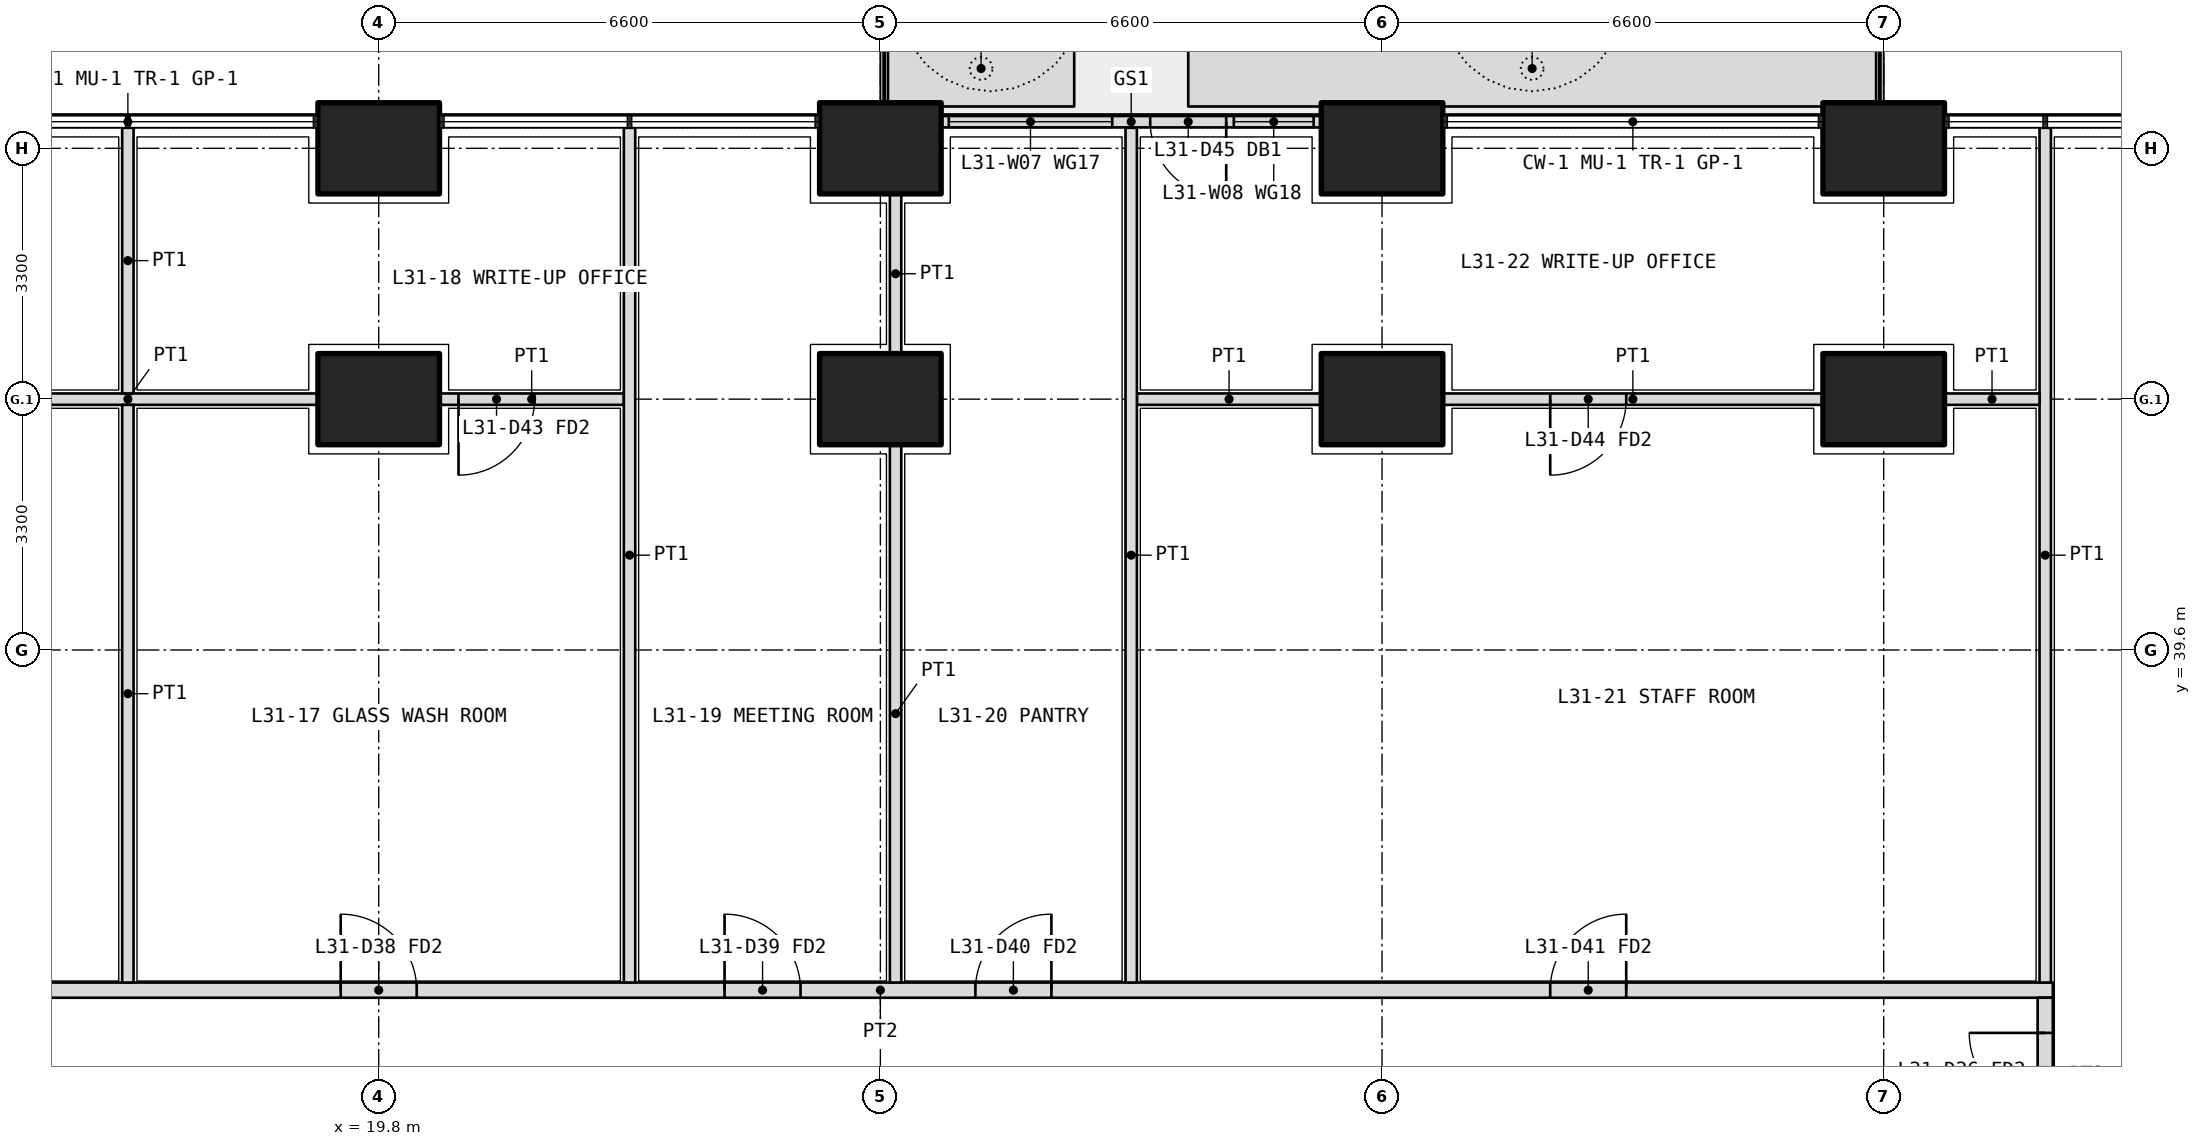
"""IFC4 building model, lengths in metres.
Left out: names, types, materials, properties, quantities, classifications, styles, units other than length and angle.
Written with IfcOpenShell. Run it as: python <this file> out.ifc"""

import sys

from ifc_helpers import new_model, si_unit, direction, frame, frame_2d, origin, origin_2d, place, context, subcontext, project, spatial, polyline, rectangle, outline, extrude, element, fill, save


model = new_model("IFC4")
c1 = context("Model", 3, precision=1e-05, world=origin(), true_north=direction((0.0, 1.0)))
c2 = subcontext(c1, "Body", "Model", "MODEL_VIEW")
j1 = project(units=[si_unit("LENGTHUNIT", "METRE"), si_unit("PLANEANGLEUNIT", "RADIAN")], contexts=[c1])
p1 = place(None, origin())
s1 = spatial("IfcSite", under=j1, at=p1, CompositionType="ELEMENT")
p2 = place(p1, origin())
s2 = spatial("IfcBuilding", under=s1, at=p2, CompositionType="ELEMENT")
p3 = place(p2, frame((0.0, 0.0, 136.8)))
s3 = spatial("IfcBuildingStorey", under=s2, at=p3, CompositionType="ELEMENT", Elevation=136.8)
for number, where, z_axis, x_axis in (
    (1, (19.8, 46.2, 0.0), (0.0, 0.0, 1.0), (1.0, 0.0, 0.0)),
    (2, (26.4, 46.2, 0.0), (0.0, 0.0, 1.0), (1.0, 0.0, 0.0)),
    (3, (33.0, 46.2, 0.0), (0.0, 0.0, 1.0), (1.0, 0.0, 0.0)),
    (4, (39.6, 46.2, 0.0), (0.0, 0.0, 1.0), (1.0, 0.0, 0.0)),
    (5, (19.8, 42.9, 0.0), (0.0, 0.0, 1.0), (1.0, 0.0, 0.0)),
    (6, (26.4, 42.9, 0.0), (0.0, 0.0, 1.0), (1.0, 0.0, 0.0)),
    (7, (33.0, 42.9, 0.0), (0.0, 0.0, 1.0), (1.0, 0.0, 0.0)),
    (8, (39.6, 42.9, 0.0), (0.0, 0.0, 1.0), (1.0, 0.0, 0.0)),
):
    element("IfcColumn", number, at=place(p3, frame(where, z_axis=z_axis, x_axis=x_axis)), inside=s3, PredefinedType="COLUMN", context=c2, shape_type="SweptSolid", body=[
        extrude(rectangle(XDim=1.6, YDim=1.2, at=origin_2d()), origin(), (0.0, 0.0, 1.0), 4.2),
    ])
p4 = place(p3, origin())
e9 = element("IfcWall", 9, at=p4, inside=s3, PredefinedType="USERDEFINED", context=c2, shape_type="SweptSolid", body=[
    extrude(outline(polyline([(26.5, 46.75), (28.95, 46.75), (28.95, 47.75), (26.5, 47.75), (26.5, 46.75)]), holes=[polyline([(26.65, 46.9), (28.8, 46.9), (28.8, 47.6), (26.65, 47.6), (26.65, 46.9)])]), origin(), (0.0, 0.0, 1.0), 1.05),
])
p5 = place(p3, origin())
e10 = element("IfcWall", 10, at=p5, inside=s3, PredefinedType="USERDEFINED", context=c2, shape_type="SweptSolid", body=[
    extrude(outline(polyline([(30.45, 46.75), (39.5, 46.75), (39.5, 47.75), (30.45, 47.75), (30.45, 46.75)]), holes=[polyline([(30.6, 46.9), (39.35, 46.9), (39.35, 47.6), (30.6, 47.6), (30.6, 46.9)])]), origin(), (0.0, 0.0, 1.0), 1.05),
])
p6 = place(p3, frame((32.2, 46.55, 0.0), z_axis=(0.0, 0.0, 1.0), x_axis=(-1.0, 0.0, 0.0)))
e11 = element("IfcWall", 11, at=p6, inside=s3, PredefinedType="SOLIDWALL", context=c2, shape_type="SweptSolid", body=[
    extrude(rectangle(XDim=5.0, YDim=0.15, at=frame_2d((2.5, 0.0))), origin(), (0.0, 0.0, 1.0), 2.6),
])
p7 = place(p6, frame((1.25, 0.0, 0.0)))
e12 = element("IfcOpeningElement", 12, at=p7, cuts=e11, PredefinedType="OPENING", context=c2, shape_type="SweptSolid", body=[
    extrude(rectangle(XDim=1.0, YDim=2.4, at=frame_2d((0.5, 1.2))), frame((0.0, 0.085, 0.0), z_axis=(0.0, -1.0, 0.0), x_axis=(1.0, 0.0, 0.0)), (0.0, 0.0, 1.0), 0.17),
])
p8 = place(p6, frame((0.1, 0.0, 0.1)))
e13 = element("IfcOpeningElement", 13, at=p8, cuts=e11, PredefinedType="OPENING", context=c2, shape_type="SweptSolid", body=[
    extrude(rectangle(XDim=1.05, YDim=2.2, at=frame_2d((0.525, 1.1))), frame((0.0, 0.085, 0.0), z_axis=(0.0, -1.0, 0.0), x_axis=(1.0, 0.0, 0.0)), (0.0, 0.0, 1.0), 0.17),
])
p9 = place(p6, frame((2.75, 0.0, 0.1)))
e14 = element("IfcOpeningElement", 14, at=p9, cuts=e11, PredefinedType="OPENING", context=c2, shape_type="SweptSolid", body=[
    extrude(rectangle(XDim=2.15, YDim=2.2, at=frame_2d((1.075, 1.1))), frame((0.0, 0.085, 0.0), z_axis=(0.0, -1.0, 0.0), x_axis=(1.0, 0.0, 0.0)), (0.0, 0.0, 1.0), 0.17),
])
p10 = place(p3, frame((10.975, 35.125, 0.0), z_axis=(0.0, 0.0, 1.0), x_axis=(1.0, 0.0, 0.0)))
e15 = element("IfcWall", 15, at=p10, inside=s3, PredefinedType="PARTITIONING", context=c2, shape_type="SweptSolid", body=[
    extrude(rectangle(XDim=30.85, YDim=0.2, at=frame_2d((15.425, 0.0))), origin(), (0.0, 0.0, 1.0), 2.85),
])
p11 = place(p10, frame((2.312, 0.0, 0.0)))
e16 = element("IfcOpeningElement", 16, at=p11, cuts=e15, PredefinedType="OPENING", context=c2, shape_type="SweptSolid", body=[
    extrude(rectangle(XDim=1.0, YDim=2.1, at=frame_2d((0.5, 1.05))), frame((0.0, 0.11, 0.0), z_axis=(0.0, -1.0, 0.0), x_axis=(1.0, 0.0, 0.0)), (0.0, 0.0, 1.0), 0.22),
])
p12 = place(p10, frame((8.325, 0.0, 0.0)))
e17 = element("IfcOpeningElement", 17, at=p12, cuts=e15, PredefinedType="OPENING", context=c2, shape_type="SweptSolid", body=[
    extrude(rectangle(XDim=1.0, YDim=2.1, at=frame_2d((0.5, 1.05))), frame((0.0, 0.11, 0.0), z_axis=(0.0, -1.0, 0.0), x_axis=(1.0, 0.0, 0.0)), (0.0, 0.0, 1.0), 0.22),
])
p13 = place(p10, frame((13.375, 0.0, 0.0)))
e18 = element("IfcOpeningElement", 18, at=p13, cuts=e15, PredefinedType="OPENING", context=c2, shape_type="SweptSolid", body=[
    extrude(rectangle(XDim=1.0, YDim=2.1, at=frame_2d((0.5, 1.05))), frame((0.0, 0.11, 0.0), z_axis=(0.0, -1.0, 0.0), x_axis=(1.0, 0.0, 0.0)), (0.0, 0.0, 1.0), 0.22),
])
p14 = place(p10, frame((16.675, 0.0, 0.0)))
e19 = element("IfcOpeningElement", 19, at=p14, cuts=e15, PredefinedType="OPENING", context=c2, shape_type="SweptSolid", body=[
    extrude(rectangle(XDim=1.0, YDim=2.1, at=frame_2d((0.5, 1.05))), frame((0.0, 0.11, 0.0), z_axis=(0.0, -1.0, 0.0), x_axis=(1.0, 0.0, 0.0)), (0.0, 0.0, 1.0), 0.22),
])
p15 = place(p10, frame((24.238, 0.0, 0.0)))
e20 = element("IfcOpeningElement", 20, at=p15, cuts=e15, PredefinedType="OPENING", context=c2, shape_type="SweptSolid", body=[
    extrude(rectangle(XDim=1.0, YDim=2.1, at=frame_2d((0.5, 1.05))), frame((0.0, 0.11, 0.0), z_axis=(0.0, -1.0, 0.0), x_axis=(1.0, 0.0, 0.0)), (0.0, 0.0, 1.0), 0.22),
])
p16 = place(p3, frame((41.725, 33.0, 0.0), z_axis=(0.0, 0.0, 1.0), x_axis=(0.0, 1.0, 0.0)))
e21 = element("IfcWall", 21, at=p16, inside=s3, PredefinedType="PARTITIONING", context=c2, shape_type="SweptSolid", body=[
    extrude(rectangle(XDim=2.025, YDim=0.2, at=frame_2d((1.012, 0.0))), origin(), (0.0, 0.0, 1.0), 2.85),
])
p17 = place(p16, frame((0.562, 0.0, 0.0)))
e22 = element("IfcOpeningElement", 22, at=p17, cuts=e21, PredefinedType="OPENING", context=c2, shape_type="SweptSolid", body=[
    extrude(rectangle(XDim=1.0, YDim=2.1, at=frame_2d((0.5, 1.05))), frame((0.0, 0.11, 0.0), z_axis=(0.0, -1.0, 0.0), x_axis=(1.0, 0.0, 0.0)), (0.0, 0.0, 1.0), 0.22),
])
p18 = place(p3, frame((41.725, 46.47, 0.0), z_axis=(0.0, 0.0, 1.0), x_axis=(0.0, -1.0, 0.0)))
e23 = element("IfcWall", 23, at=p18, inside=s3, PredefinedType="PARTITIONING", context=c2, shape_type="SweptSolid", body=[
    extrude(rectangle(XDim=11.245, YDim=0.15, at=frame_2d((5.623, 0.0))), origin(), (0.0, 0.0, 1.0), 2.6),
])
p19 = place(p3, frame((41.65, 42.9, 0.0), z_axis=(0.0, 0.0, 1.0), x_axis=(-1.0, 0.0, 0.0)))
e24 = element("IfcWall", 24, at=p19, inside=s3, PredefinedType="PARTITIONING", context=c2, shape_type="SweptSolid", body=[
    extrude(rectangle(XDim=1.25, YDim=0.15, at=frame_2d((0.625, 0.0))), origin(), (0.0, 0.0, 1.0), 2.85),
])
p20 = place(p3, frame((38.8, 42.9, 0.0), z_axis=(0.0, 0.0, 1.0), x_axis=(-1.0, 0.0, 0.0)))
e25 = element("IfcWall", 25, at=p20, inside=s3, PredefinedType="PARTITIONING", context=c2, shape_type="SweptSolid", body=[
    extrude(rectangle(XDim=5.0, YDim=0.15, at=frame_2d((2.5, 0.0))), origin(), (0.0, 0.0, 1.0), 2.85),
])
p21 = place(p20, frame((2.587, 0.0, 0.0)))
e26 = element("IfcOpeningElement", 26, at=p21, cuts=e25, PredefinedType="OPENING", context=c2, shape_type="SweptSolid", body=[
    extrude(rectangle(XDim=1.0, YDim=2.1, at=frame_2d((0.5, 1.05))), frame((0.0, 0.085, 0.0), z_axis=(0.0, -1.0, 0.0), x_axis=(1.0, 0.0, 0.0)), (0.0, 0.0, 1.0), 0.17),
])
p22 = place(p3, frame((32.2, 42.9, 0.0), z_axis=(0.0, 0.0, 1.0), x_axis=(-1.0, 0.0, 0.0)))
e27 = element("IfcWall", 27, at=p22, inside=s3, PredefinedType="PARTITIONING", context=c2, shape_type="SweptSolid", body=[
    extrude(rectangle(XDim=2.425, YDim=0.15, at=frame_2d((1.212, 0.0))), origin(), (0.0, 0.0, 1.0), 2.85),
])
p23 = place(p3, frame((23.025, 42.9, 0.0), z_axis=(0.0, 0.0, 1.0), x_axis=(-1.0, 0.0, 0.0)))
e28 = element("IfcWall", 28, at=p23, inside=s3, PredefinedType="PARTITIONING", context=c2, shape_type="SweptSolid", body=[
    extrude(rectangle(XDim=2.425, YDim=0.15, at=frame_2d((1.212, 0.0))), origin(), (0.0, 0.0, 1.0), 2.85),
])
p24 = place(p23, frame((1.175, 0.0, 0.0)))
e29 = element("IfcOpeningElement", 29, at=p24, cuts=e28, PredefinedType="OPENING", context=c2, shape_type="SweptSolid", body=[
    extrude(rectangle(XDim=1.0, YDim=2.1, at=frame_2d((0.5, 1.05))), frame((0.0, 0.085, 0.0), z_axis=(0.0, -1.0, 0.0), x_axis=(1.0, 0.0, 0.0)), (0.0, 0.0, 1.0), 0.17),
])
p25 = place(p3, frame((19.0, 42.9, 0.0), z_axis=(0.0, 0.0, 1.0), x_axis=(-1.0, 0.0, 0.0)))
e30 = element("IfcWall", 30, at=p25, inside=s3, PredefinedType="PARTITIONING", context=c2, shape_type="SweptSolid", body=[
    extrude(rectangle(XDim=5.0, YDim=0.15, at=frame_2d((2.5, 0.0))), origin(), (0.0, 0.0, 1.0), 2.85),
])
p26 = place(p3, frame((26.6, 45.6, 0.0), z_axis=(0.0, 0.0, 1.0), x_axis=(0.0, -1.0, 0.0)))
e31 = element("IfcWall", 31, at=p26, inside=s3, PredefinedType="PARTITIONING", context=c2, shape_type="SweptSolid", body=[
    extrude(rectangle(XDim=2.1, YDim=0.15, at=frame_2d((1.05, 0.0))), origin(), (0.0, 0.0, 1.0), 2.85),
])
p27 = place(p3, frame((26.6, 42.3, 0.0), z_axis=(0.0, 0.0, 1.0), x_axis=(0.0, -1.0, 0.0)))
e32 = element("IfcWall", 32, at=p27, inside=s3, PredefinedType="PARTITIONING", context=c2, shape_type="SweptSolid", body=[
    extrude(rectangle(XDim=7.075, YDim=0.15, at=frame_2d((3.538, 0.0))), origin(), (0.0, 0.0, 1.0), 2.85),
])
p28 = place(p3, frame((16.5, 46.47, 0.0), z_axis=(0.0, 0.0, 1.0), x_axis=(0.0, -1.0, 0.0)))
e33 = element("IfcWall", 33, at=p28, inside=s3, PredefinedType="PARTITIONING", context=c2, shape_type="SweptSolid", body=[
    extrude(rectangle(XDim=3.495, YDim=0.15, at=frame_2d((1.748, 0.0))), origin(), (0.0, 0.0, 1.0), 2.6),
])
p29 = place(p3, frame((16.5, 42.825, 0.0), z_axis=(0.0, 0.0, 1.0), x_axis=(0.0, -1.0, 0.0)))
e34 = element("IfcWall", 34, at=p29, inside=s3, PredefinedType="PARTITIONING", context=c2, shape_type="SweptSolid", body=[
    extrude(rectangle(XDim=7.6, YDim=0.15, at=frame_2d((3.8, 0.0))), origin(), (0.0, 0.0, 1.0), 3.9),
])
for number, where, z_axis, x_axis in (
    (35, (23.1, 46.47, 0.0), (0.0, 0.0, 1.0), (0.0, -1.0, 0.0)),
    (36, (29.7, 46.47, 0.0), (0.0, 0.0, 1.0), (0.0, -1.0, 0.0)),
):
    element("IfcWall", number, at=place(p3, frame(where, z_axis=z_axis, x_axis=x_axis)), inside=s3, PredefinedType="PARTITIONING", context=c2, shape_type="SweptSolid", body=[
        extrude(rectangle(XDim=11.245, YDim=0.15, at=frame_2d((5.623, 0.0))), origin(), (0.0, 0.0, 1.0), 2.6),
    ])
p30 = place(p7, origin())
e37 = element("IfcDoor", 37, at=p30, inside=s3, OperationType="SINGLE_SWING_LEFT", PredefinedType="DOOR", context=c2, shape_type="SweptSolid", body=[
    extrude(rectangle(XDim=1.0, YDim=2.4, at=frame_2d((0.5, 1.2))), frame((0.0, 0.025, 0.0), z_axis=(0.0, -1.0, 0.0), x_axis=(1.0, 0.0, 0.0)), (0.0, 0.0, 1.0), 0.05),
])
fill(e12, e37)
p31 = place(p8, origin())
e38 = element("IfcWindow", 38, at=p31, inside=s3, PartitioningType="SINGLE_PANEL", PredefinedType="WINDOW", context=c2, shape_type="SweptSolid", body=[
    extrude(rectangle(XDim=1.05, YDim=2.2, at=frame_2d((0.525, 1.1))), frame((0.0, 0.03, 0.0), z_axis=(0.0, -1.0, 0.0), x_axis=(1.0, 0.0, 0.0)), (0.0, 0.0, 1.0), 0.06),
])
fill(e13, e38)
p32 = place(p9, origin())
e39 = element("IfcWindow", 39, at=p32, inside=s3, PartitioningType="SINGLE_PANEL", PredefinedType="WINDOW", context=c2, shape_type="SweptSolid", body=[
    extrude(rectangle(XDim=2.15, YDim=2.2, at=frame_2d((1.075, 1.1))), frame((0.0, 0.03, 0.0), z_axis=(0.0, -1.0, 0.0), x_axis=(1.0, 0.0, 0.0)), (0.0, 0.0, 1.0), 0.06),
])
fill(e14, e39)
p33 = place(p17, origin())
e40 = element("IfcDoor", 40, at=p33, inside=s3, OperationType="SINGLE_SWING_RIGHT", PredefinedType="DOOR", context=c2, shape_type="SweptSolid", body=[
    extrude(rectangle(XDim=1.0, YDim=2.1, at=frame_2d((0.5, 1.05))), frame((0.0, 0.025, 0.0), z_axis=(0.0, -1.0, 0.0), x_axis=(1.0, 0.0, 0.0)), (0.0, 0.0, 1.0), 0.05),
])
fill(e22, e40)
p34 = place(p12, origin())
e41 = element("IfcDoor", 41, at=p34, inside=s3, OperationType="SINGLE_SWING_LEFT", PredefinedType="DOOR", context=c2, shape_type="SweptSolid", body=[
    extrude(rectangle(XDim=1.0, YDim=2.1, at=frame_2d((0.5, 1.05))), frame((0.0, 0.025, 0.0), z_axis=(0.0, -1.0, 0.0), x_axis=(1.0, 0.0, 0.0)), (0.0, 0.0, 1.0), 0.05),
])
fill(e17, e41)
p35 = place(p24, origin())
e42 = element("IfcDoor", 42, at=p35, inside=s3, OperationType="SINGLE_SWING_RIGHT", PredefinedType="DOOR", context=c2, shape_type="SweptSolid", body=[
    extrude(rectangle(XDim=1.0, YDim=2.1, at=frame_2d((0.5, 1.05))), frame((0.0, 0.025, 0.0), z_axis=(0.0, -1.0, 0.0), x_axis=(1.0, 0.0, 0.0)), (0.0, 0.0, 1.0), 0.05),
])
fill(e29, e42)
p36 = place(p13, origin())
e43 = element("IfcDoor", 43, at=p36, inside=s3, OperationType="SINGLE_SWING_LEFT", PredefinedType="DOOR", context=c2, shape_type="SweptSolid", body=[
    extrude(rectangle(XDim=1.0, YDim=2.1, at=frame_2d((0.5, 1.05))), frame((0.0, 0.025, 0.0), z_axis=(0.0, -1.0, 0.0), x_axis=(1.0, 0.0, 0.0)), (0.0, 0.0, 1.0), 0.05),
])
fill(e18, e43)
p37 = place(p14, origin())
e44 = element("IfcDoor", 44, at=p37, inside=s3, OperationType="SINGLE_SWING_RIGHT", PredefinedType="DOOR", context=c2, shape_type="SweptSolid", body=[
    extrude(rectangle(XDim=1.0, YDim=2.1, at=frame_2d((0.5, 1.05))), frame((0.0, 0.025, 0.0), z_axis=(0.0, -1.0, 0.0), x_axis=(1.0, 0.0, 0.0)), (0.0, 0.0, 1.0), 0.05),
])
fill(e19, e44)
p38 = place(p15, origin())
e45 = element("IfcDoor", 45, at=p38, inside=s3, OperationType="SINGLE_SWING_RIGHT", PredefinedType="DOOR", context=c2, shape_type="SweptSolid", body=[
    extrude(rectangle(XDim=1.0, YDim=2.1, at=frame_2d((0.5, 1.05))), frame((0.0, 0.025, 0.0), z_axis=(0.0, -1.0, 0.0), x_axis=(1.0, 0.0, 0.0)), (0.0, 0.0, 1.0), 0.05),
])
fill(e20, e45)
p39 = place(p21, origin())
e46 = element("IfcDoor", 46, at=p39, inside=s3, OperationType="SINGLE_SWING_RIGHT", PredefinedType="DOOR", context=c2, shape_type="SweptSolid", body=[
    extrude(rectangle(XDim=1.0, YDim=2.1, at=frame_2d((0.5, 1.05))), frame((0.0, 0.025, 0.0), z_axis=(0.0, -1.0, 0.0), x_axis=(1.0, 0.0, 0.0)), (0.0, 0.0, 1.0), 0.05),
])
fill(e26, e46)
save(model, sys.argv[1])
